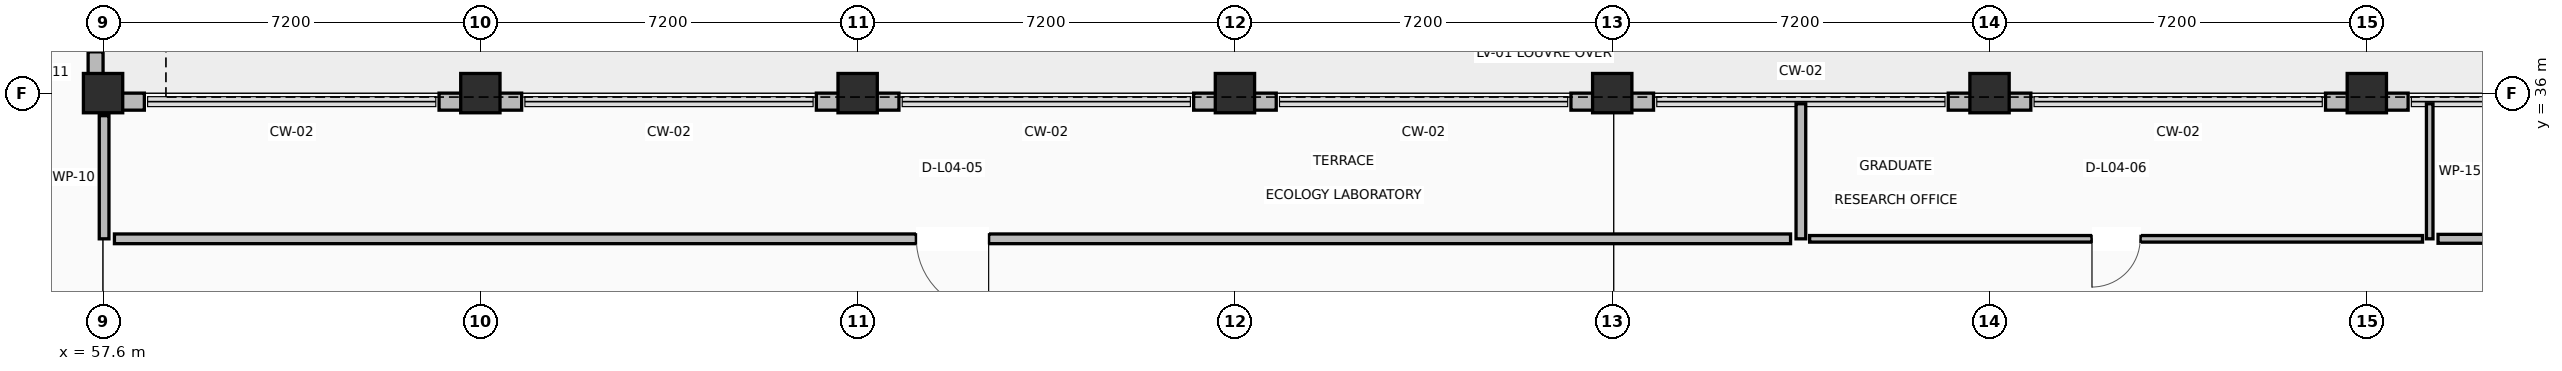
"""IFC4 building model, lengths in metres.
Left out: names, types, materials, properties, quantities, classifications, styles, units other than length and angle.
Written with IfcOpenShell. Run it as: python <this file> out.ifc"""

import sys

from ifc_helpers import new_model, si_unit, direction, frame, frame_2d, origin, origin_2d, place, context, subcontext, project, spatial, rectangle, extrude, element, fill, save


model = new_model("IFC4")
c1 = context("Model", 3, precision=1e-05, world=origin(), true_north=direction((0.0, 1.0)))
c2 = subcontext(c1, "Body", "Model", "MODEL_VIEW")
j1 = project(units=[si_unit("LENGTHUNIT", "METRE"), si_unit("PLANEANGLEUNIT", "RADIAN")], contexts=[c1])
p1 = place(None, origin())
s1 = spatial("IfcSite", under=j1, at=p1, CompositionType="ELEMENT")
p2 = place(p1, origin())
s2 = spatial("IfcBuilding", under=s1, at=p2, CompositionType="ELEMENT")
p3 = place(p2, frame((0.0, 0.0, 18.0)))
s3 = spatial("IfcBuildingStorey", under=s2, at=p3, CompositionType="ELEMENT", Elevation=18.0)
for number, where, z_axis, x_axis in (
    (1, (57.6, 36.0, 0.0), (0.0, 0.0, 1.0), (1.0, 0.0, 0.0)),
    (2, (64.8, 36.0, 0.0), (0.0, 0.0, 1.0), (1.0, 0.0, 0.0)),
    (3, (72.0, 36.0, 0.0), (0.0, 0.0, 1.0), (1.0, 0.0, 0.0)),
    (4, (79.2, 36.0, 0.0), (0.0, 0.0, 1.0), (1.0, 0.0, 0.0)),
    (5, (86.4, 36.0, 0.0), (0.0, 0.0, 1.0), (1.0, 0.0, 0.0)),
    (6, (93.6, 36.0, 0.0), (0.0, 0.0, 1.0), (1.0, 0.0, 0.0)),
    (7, (100.8, 36.0, 0.0), (0.0, 0.0, 1.0), (1.0, 0.0, 0.0)),
):
    element("IfcColumn", number, at=place(p3, frame(where, z_axis=z_axis, x_axis=x_axis)), inside=s3, PredefinedType="COLUMN", context=c2, shape_type="SweptSolid", body=[
        extrude(rectangle(XDim=0.75, YDim=0.75, at=origin_2d()), origin(), (0.0, 0.0, 1.0), 4.22),
    ])
p4 = place(p3, frame((57.458, 36.0, 0.0), z_axis=(0.0, 0.0, 1.0), x_axis=(0.0, 1.0, 0.0)))
e8 = element("IfcWall", 8, at=p4, inside=s3, PredefinedType="STANDARD", context=c2, shape_type="SweptSolid", body=[
    extrude(rectangle(XDim=0.788, YDim=0.285, at=frame_2d((0.394, 0.0))), origin(), (0.0, 0.0, 1.0), 3.26),
])
for number, where, z_axis, x_axis in (
    (9, (101.588, 35.837, 0.0), (0.0, 0.0, 1.0), (-1.0, 0.0, 0.0)),
    (10, (94.388, 35.837, 0.0), (0.0, 0.0, 1.0), (-1.0, 0.0, 0.0)),
    (11, (87.188, 35.837, 0.0), (0.0, 0.0, 1.0), (-1.0, 0.0, 0.0)),
    (12, (79.988, 35.837, 0.0), (0.0, 0.0, 1.0), (-1.0, 0.0, 0.0)),
):
    element("IfcWall", number, at=place(p3, frame(where, z_axis=z_axis, x_axis=x_axis)), inside=s3, PredefinedType="STANDARD", context=c2, shape_type="SweptSolid", body=[
        extrude(rectangle(XDim=1.576, YDim=0.325, at=frame_2d((0.788, 0.0))), origin(), (0.0, 0.0, 1.0), 3.26),
    ])
p5 = place(p3, frame((72.788, 35.837, 0.0), z_axis=(0.0, 0.0, 1.0), x_axis=(-1.0, 0.0, 0.0)))
e13 = element("IfcWall", 13, at=p5, inside=s3, PredefinedType="STANDARD", context=c2, shape_type="SweptSolid", body=[
    extrude(rectangle(XDim=1.576, YDim=0.325, at=frame_2d((0.788, 0.0))), origin(), (0.0, 0.0, 1.0), 3.26),
])
p6 = place(p3, frame((65.588, 35.837, 0.0), z_axis=(0.0, 0.0, 1.0), x_axis=(-1.0, 0.0, 0.0)))
e14 = element("IfcWall", 14, at=p6, inside=s3, PredefinedType="STANDARD", context=c2, shape_type="SweptSolid", body=[
    extrude(rectangle(XDim=1.576, YDim=0.325, at=frame_2d((0.788, 0.0))), origin(), (0.0, 0.0, 1.0), 3.26),
])
p7 = place(p3, frame((58.388, 35.837, 0.0), z_axis=(0.0, 0.0, 1.0), x_axis=(-1.0, 0.0, 0.0)))
e15 = element("IfcWall", 15, at=p7, inside=s3, PredefinedType="STANDARD", context=c2, shape_type="SweptSolid", body=[
    extrude(rectangle(XDim=1.073, YDim=0.325, at=frame_2d((0.537, 0.0))), origin(), (0.0, 0.0, 1.0), 3.26),
])
p8 = place(p3, frame((57.62, 33.22, 0.0), z_axis=(0.0, 0.0, 1.0), x_axis=(0.0, 1.0, 0.0)))
e16 = element("IfcWall", 16, at=p8, inside=s3, PredefinedType="PARTITIONING", context=c2, shape_type="SweptSolid", body=[
    extrude(rectangle(XDim=2.35, YDim=0.185, at=frame_2d((1.175, 0.0))), origin(), (0.0, 0.0, 1.0), 3.26),
])
p9 = place(p3, frame((90.0, 35.797, 0.0), z_axis=(0.0, 0.0, 1.0), x_axis=(0.0, -1.0, 0.0)))
e17 = element("IfcWall", 17, at=p9, inside=s3, PredefinedType="PARTITIONING", context=c2, shape_type="SweptSolid", body=[
    extrude(rectangle(XDim=2.577, YDim=0.185, at=frame_2d((1.289, 0.0))), origin(), (0.0, 0.0, 1.0), 3.26),
])
p10 = place(p3, frame((89.803, 33.22, 0.0), z_axis=(0.0, 0.0, 1.0), x_axis=(-1.0, 0.0, 0.0)))
e18 = element("IfcWall", 18, at=p10, inside=s3, PredefinedType="PARTITIONING", context=c2, shape_type="SweptSolid", body=[
    extrude(rectangle(XDim=31.986, YDim=0.185, at=frame_2d((15.993, 0.0))), origin(), (0.0, 0.0, 1.0), 3.26),
])
p11 = place(p10, frame((15.303, 0.0, 0.0)))
e19 = element("IfcOpeningElement", 19, at=p11, cuts=e18, PredefinedType="OPENING", context=c2, shape_type="SweptSolid", body=[
    extrude(rectangle(XDim=1.38, YDim=2.15, at=frame_2d((0.69, 1.075))), frame((0.0, 0.103, 0.0), z_axis=(0.0, -1.0, 0.0), x_axis=(1.0, 0.0, 0.0)), (0.0, 0.0, 1.0), 0.205),
])
p12 = place(p3, frame((102.0, 35.797, 0.0), z_axis=(0.0, 0.0, 1.0), x_axis=(0.0, -1.0, 0.0)))
e20 = element("IfcWall", 20, at=p12, inside=s3, PredefinedType="PARTITIONING", context=c2, shape_type="SweptSolid", body=[
    extrude(rectangle(XDim=2.577, YDim=0.125, at=frame_2d((1.289, 0.0))), origin(), (0.0, 0.0, 1.0), 3.26),
])
p13 = place(p3, frame((101.863, 33.22, 0.0), z_axis=(0.0, 0.0, 1.0), x_axis=(-1.0, 0.0, 0.0)))
e21 = element("IfcWall", 21, at=p13, inside=s3, PredefinedType="PARTITIONING", context=c2, shape_type="SweptSolid", body=[
    extrude(rectangle(XDim=11.696, YDim=0.125, at=frame_2d((5.848, 0.0))), origin(), (0.0, 0.0, 1.0), 3.26),
])
p14 = place(p13, frame((5.388, 0.0, 0.0)))
e22 = element("IfcOpeningElement", 22, at=p14, cuts=e21, PredefinedType="OPENING", context=c2, shape_type="SweptSolid", body=[
    extrude(rectangle(XDim=0.92, YDim=2.1, at=frame_2d((0.46, 1.05))), frame((0.0, 0.073, 0.0), z_axis=(0.0, -1.0, 0.0), x_axis=(1.0, 0.0, 0.0)), (0.0, 0.0, 1.0), 0.145),
])
p15 = place(p3, frame((115.017, 33.22, 0.0), z_axis=(0.0, 0.0, 1.0), x_axis=(-1.0, 0.0, 0.0)))
e23 = element("IfcWall", 23, at=p15, inside=s3, PredefinedType="PARTITIONING", context=c2, shape_type="SweptSolid", body=[
    extrude(rectangle(XDim=12.858, YDim=0.17, at=frame_2d((6.429, 0.0))), origin(), (0.0, 0.0, 1.0), 3.26),
])
p16 = place(p15, frame((5.904, 0.0, 0.0)))
e24 = element("IfcOpeningElement", 24, at=p16, cuts=e23, PredefinedType="OPENING", context=c2, shape_type="SweptSolid", body=[
    extrude(rectangle(XDim=1.05, YDim=2.15, at=frame_2d((0.525, 1.075))), frame((0.0, 0.095, 0.0), z_axis=(0.0, -1.0, 0.0), x_axis=(1.0, 0.0, 0.0)), (0.0, 0.0, 1.0), 0.19),
])
p17 = place(p11, origin())
e25 = element("IfcDoor", 25, at=p17, inside=s3, OperationType="SINGLE_SWING_LEFT", PredefinedType="DOOR", context=c2, shape_type="SweptSolid", body=[
    extrude(rectangle(XDim=1.38, YDim=2.15, at=frame_2d((0.69, 1.075))), frame((0.0, 0.025, 0.0), z_axis=(0.0, -1.0, 0.0), x_axis=(1.0, 0.0, 0.0)), (0.0, 0.0, 1.0), 0.05),
])
fill(e19, e25)
p18 = place(p14, origin())
e26 = element("IfcDoor", 26, at=p18, inside=s3, OperationType="SINGLE_SWING_RIGHT", PredefinedType="DOOR", context=c2, shape_type="SweptSolid", body=[
    extrude(rectangle(XDim=0.92, YDim=2.1, at=frame_2d((0.46, 1.05))), frame((0.0, 0.025, 0.0), z_axis=(0.0, -1.0, 0.0), x_axis=(1.0, 0.0, 0.0)), (0.0, 0.0, 1.0), 0.05),
])
fill(e22, e26)
save(model, sys.argv[1])
